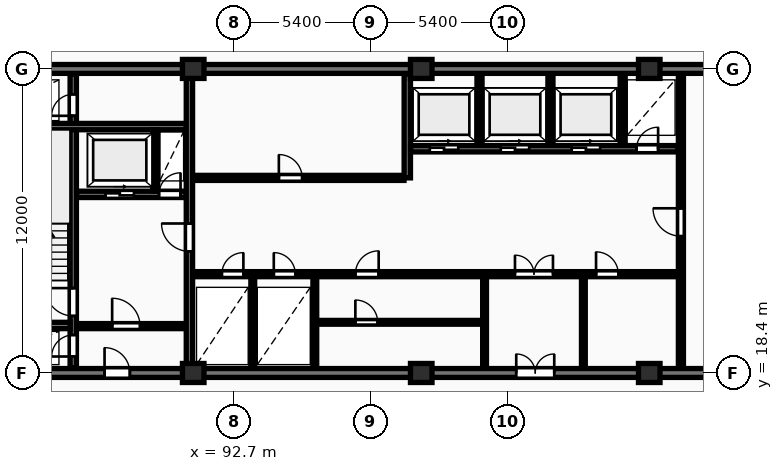
"""IFC4 building model, lengths in metres.
Left out: names, types, materials, properties, quantities, classifications, styles, units other than length and angle.
Written with IfcOpenShell. Run it as: python <this file> out.ifc"""

import sys

from ifc_helpers import new_model, si_unit, direction, frame, frame_2d, origin, origin_2d, place, context, subcontext, project, spatial, rectangle, extrude, element, fill, save


model = new_model("IFC4")
c1 = context("Model", 3, precision=1e-05, world=origin(), true_north=direction((0.0, 1.0)))
c2 = subcontext(c1, "Body", "Model", "MODEL_VIEW")
j1 = project(units=[si_unit("LENGTHUNIT", "METRE"), si_unit("PLANEANGLEUNIT", "RADIAN")], contexts=[c1])
p1 = place(None, origin())
s1 = spatial("IfcSite", under=j1, at=p1, CompositionType="ELEMENT")
p2 = place(p1, origin())
s2 = spatial("IfcBuilding", under=s1, at=p2, CompositionType="ELEMENT")
p3 = place(p2, frame((0.0, 0.0, 119.8)))
s3 = spatial("IfcBuildingStorey", under=s2, at=p3, CompositionType="ELEMENT", Elevation=119.8)
for number, where, z_axis, x_axis in (
    (1, (91.1, 18.4, 0.0), (0.0, 0.0, 1.0), (1.0, 0.0, 0.0)),
    (2, (91.1, 30.4, 0.0), (0.0, 0.0, 1.0), (1.0, 0.0, 0.0)),
    (3, (100.1, 18.4, 0.0), (0.0, 0.0, 1.0), (1.0, 0.0, 0.0)),
    (4, (100.1, 30.4, 0.0), (0.0, 0.0, 1.0), (1.0, 0.0, 0.0)),
    (5, (109.1, 18.4, 0.0), (0.0, 0.0, 1.0), (1.0, 0.0, 0.0)),
    (6, (109.1, 30.4, 0.0), (0.0, 0.0, 1.0), (1.0, 0.0, 0.0)),
):
    element("IfcColumn", number, at=place(p3, frame(where, z_axis=z_axis, x_axis=x_axis)), inside=s3, PredefinedType="COLUMN", context=c2, shape_type="SweptSolid", body=[
        extrude(rectangle(XDim=0.85, YDim=0.75, at=origin_2d()), origin(), (0.0, 0.0, 1.0), 3.25),
    ])
p4 = place(p3, frame((81.925, 30.4, 0.0), z_axis=(0.0, 0.0, 1.0), x_axis=(1.0, 0.0, 0.0)))
e7 = element("IfcWall", 7, at=p4, inside=s3, PredefinedType="SHEAR", context=c2, shape_type="SweptSolid", body=[
    extrude(rectangle(XDim=36.265, YDim=0.35, at=frame_2d((18.132, 0.0))), origin(), (0.0, 0.0, 1.0), 3.25),
])
p5 = place(p3, frame((81.925, 18.4, 0.0), z_axis=(0.0, 0.0, 1.0), x_axis=(1.0, 0.0, 0.0)))
e8 = element("IfcWall", 8, at=p5, inside=s3, PredefinedType="SHEAR", context=c2, shape_type="SweptSolid", body=[
    extrude(rectangle(XDim=36.265, YDim=0.35, at=frame_2d((18.132, 0.0))), origin(), (0.0, 0.0, 1.0), 3.25),
])
p6 = place(p5, frame((5.675, 0.0, 0.0)))
e9 = element("IfcOpeningElement", 9, at=p6, cuts=e8, PredefinedType="OPENING", context=c2, shape_type="SweptSolid", body=[
    extrude(rectangle(XDim=1.0, YDim=2.15, at=frame_2d((0.5, 1.075))), frame((0.0, 0.185, 0.0), z_axis=(0.0, -1.0, 0.0), x_axis=(1.0, 0.0, 0.0)), (0.0, 0.0, 1.0), 0.37),
])
p7 = place(p5, frame((21.925, 0.0, 0.0)))
e10 = element("IfcOpeningElement", 10, at=p7, cuts=e8, PredefinedType="OPENING", context=c2, shape_type="SweptSolid", body=[
    extrude(rectangle(XDim=1.5, YDim=2.2, at=frame_2d((0.75, 1.1))), frame((0.0, 0.185, 0.0), z_axis=(0.0, -1.0, 0.0), x_axis=(1.0, 0.0, 0.0)), (0.0, 0.0, 1.0), 0.37),
])
p8 = place(p5, frame((29.875, 0.0, 0.0)))
e11 = element("IfcOpeningElement", 11, at=p8, cuts=e8, PredefinedType="OPENING", context=c2, shape_type="SweptSolid", body=[
    extrude(rectangle(XDim=1.0, YDim=2.15, at=frame_2d((0.5, 1.075))), frame((0.0, 0.185, 0.0), z_axis=(0.0, -1.0, 0.0), x_axis=(1.0, 0.0, 0.0)), (0.0, 0.0, 1.0), 0.37),
])
p9 = place(p3, frame((86.365, 18.6, 0.0), z_axis=(0.0, 0.0, 1.0), x_axis=(0.0, 1.0, 0.0)))
e12 = element("IfcWall", 12, at=p9, inside=s3, PredefinedType="SHEAR", context=c2, shape_type="SweptSolid", body=[
    extrude(rectangle(XDim=11.6, YDim=0.25, at=frame_2d((5.8, 0.0))), origin(), (0.0, 0.0, 1.0), 3.25),
])
p10 = place(p9, frame((0.45, 0.0, 0.0)))
e13 = element("IfcOpeningElement", 13, at=p10, cuts=e12, PredefinedType="OPENING", context=c2, shape_type="SweptSolid", body=[
    extrude(rectangle(XDim=0.85, YDim=2.05, at=frame_2d((0.425, 1.025))), frame((0.0, 0.135, 0.0), z_axis=(0.0, -1.0, 0.0), x_axis=(1.0, 0.0, 0.0)), (0.0, 0.0, 1.0), 0.27),
])
p11 = place(p9, frame((2.05, 0.0, 0.0)))
e14 = element("IfcOpeningElement", 14, at=p11, cuts=e12, PredefinedType="OPENING", context=c2, shape_type="SweptSolid", body=[
    extrude(rectangle(XDim=1.1, YDim=2.1, at=frame_2d((0.55, 1.05))), frame((0.0, 0.135, 0.0), z_axis=(0.0, -1.0, 0.0), x_axis=(1.0, 0.0, 0.0)), (0.0, 0.0, 1.0), 0.27),
])
p12 = place(p9, frame((9.95, 0.0, 0.0)))
e15 = element("IfcOpeningElement", 15, at=p12, cuts=e12, PredefinedType="OPENING", context=c2, shape_type="SweptSolid", body=[
    extrude(rectangle(XDim=0.85, YDim=2.05, at=frame_2d((0.425, 1.025))), frame((0.0, 0.135, 0.0), z_axis=(0.0, -1.0, 0.0), x_axis=(1.0, 0.0, 0.0)), (0.0, 0.0, 1.0), 0.27),
])
p13 = place(p3, frame((83.0, 20.275, 0.0), z_axis=(0.0, 0.0, 1.0), x_axis=(1.0, 0.0, 0.0)))
e16 = element("IfcWall", 16, at=p13, inside=s3, PredefinedType="SHEAR", context=c2, shape_type="SweptSolid", body=[
    extrude(rectangle(XDim=3.24, YDim=0.25, at=frame_2d((1.62, 0.0))), origin(), (0.0, 0.0, 1.0), 3.25),
])
p14 = place(p3, frame((83.0, 28.125, 0.0), z_axis=(0.0, 0.0, 1.0), x_axis=(1.0, 0.0, 0.0)))
e17 = element("IfcWall", 17, at=p14, inside=s3, PredefinedType="SHEAR", context=c2, shape_type="SweptSolid", body=[
    extrude(rectangle(XDim=7.82, YDim=0.25, at=frame_2d((3.91, 0.0))), origin(), (0.0, 0.0, 1.0), 3.25),
])
p15 = place(p3, frame((86.5, 25.45, 0.0), z_axis=(0.0, 0.0, 1.0), x_axis=(1.0, 0.0, 0.0)))
e18 = element("IfcWall", 18, at=p15, inside=s3, PredefinedType="SHEAR", context=c2, shape_type="SweptSolid", body=[
    extrude(rectangle(XDim=4.32, YDim=0.25, at=frame_2d((2.16, 0.0))), origin(), (0.0, 0.0, 1.0), 3.25),
])
p16 = place(p15, frame((1.14, 0.0, 0.0)))
e19 = element("IfcOpeningElement", 19, at=p16, cuts=e18, PredefinedType="OPENING", context=c2, shape_type="SweptSolid", body=[
    extrude(rectangle(XDim=1.12, YDim=2.12, at=frame_2d((0.56, 1.06))), frame((0.0, 0.135, 0.0), z_axis=(0.0, -1.0, 0.0), x_axis=(1.0, 0.0, 0.0)), (0.0, 0.0, 1.0), 0.27),
])
p17 = place(p15, frame((3.25, 0.0, 0.0)))
e20 = element("IfcOpeningElement", 20, at=p17, cuts=e18, PredefinedType="OPENING", context=c2, shape_type="SweptSolid", body=[
    extrude(rectangle(XDim=0.85, YDim=2.05, at=frame_2d((0.425, 1.025))), frame((0.0, 0.135, 0.0), z_axis=(0.0, -1.0, 0.0), x_axis=(1.0, 0.0, 0.0)), (0.0, 0.0, 1.0), 0.27),
])
p18 = place(p3, frame((89.6, 25.58, 0.0), z_axis=(0.0, 0.0, 1.0), x_axis=(0.0, 1.0, 0.0)))
e21 = element("IfcWall", 21, at=p18, inside=s3, PredefinedType="PARTITIONING", context=c2, shape_type="SweptSolid", body=[
    extrude(rectangle(XDim=2.42, YDim=0.2, at=frame_2d((1.21, 0.0))), origin(), (0.0, 0.0, 1.0), 2.97),
])
p19 = place(p3, frame((86.5, 20.25, 0.0), z_axis=(0.0, 0.0, 1.0), x_axis=(1.0, 0.0, 0.0)))
e22 = element("IfcWall", 22, at=p19, inside=s3, PredefinedType="PARTITIONING", context=c2, shape_type="SweptSolid", body=[
    extrude(rectangle(XDim=4.32, YDim=0.2, at=frame_2d((2.16, 0.0))), origin(), (0.0, 0.0, 1.0), 2.97),
])
p20 = place(p19, frame((1.4, 0.0, 0.0)))
e23 = element("IfcOpeningElement", 23, at=p20, cuts=e22, PredefinedType="OPENING", context=c2, shape_type="SweptSolid", body=[
    extrude(rectangle(XDim=1.1, YDim=2.1, at=frame_2d((0.55, 1.05))), frame((0.0, 0.11, 0.0), z_axis=(0.0, -1.0, 0.0), x_axis=(1.0, 0.0, 0.0)), (0.0, 0.0, 1.0), 0.22),
])
p21 = place(p3, frame((90.95, 18.6, 0.0), z_axis=(0.0, 0.0, 1.0), x_axis=(0.0, 1.0, 0.0)))
e24 = element("IfcWall", 24, at=p21, inside=s3, PredefinedType="SHEAR", context=c2, shape_type="SweptSolid", body=[
    extrude(rectangle(XDim=11.6, YDim=0.25, at=frame_2d((5.8, 0.0))), origin(), (0.0, 0.0, 1.0), 3.25),
])
p22 = place(p21, frame((4.6, 0.0, 0.0)))
e25 = element("IfcOpeningElement", 25, at=p22, cuts=e24, PredefinedType="OPENING", context=c2, shape_type="SweptSolid", body=[
    extrude(rectangle(XDim=1.1, YDim=2.1, at=frame_2d((0.55, 1.05))), frame((0.0, 0.135, 0.0), z_axis=(0.0, -1.0, 0.0), x_axis=(1.0, 0.0, 0.0)), (0.0, 0.0, 1.0), 0.27),
])
p23 = place(p3, frame((91.08, 26.1, 0.0), z_axis=(0.0, 0.0, 1.0), x_axis=(1.0, 0.0, 0.0)))
e26 = element("IfcWall", 26, at=p23, inside=s3, PredefinedType="PARTITIONING", context=c2, shape_type="SweptSolid", body=[
    extrude(rectangle(XDim=8.34, YDim=0.2, at=frame_2d((4.17, 0.0))), origin(), (0.0, 0.0, 1.0), 2.97),
])
p24 = place(p23, frame((3.4, 0.0, 0.0)))
e27 = element("IfcOpeningElement", 27, at=p24, cuts=e26, PredefinedType="OPENING", context=c2, shape_type="SweptSolid", body=[
    extrude(rectangle(XDim=0.92, YDim=2.08, at=frame_2d((0.46, 1.04))), frame((0.0, 0.11, 0.0), z_axis=(0.0, -1.0, 0.0), x_axis=(1.0, 0.0, 0.0)), (0.0, 0.0, 1.0), 0.22),
])
p25 = place(p3, frame((99.55, 26.1, 0.0), z_axis=(0.0, 0.0, 1.0), x_axis=(0.0, 1.0, 0.0)))
e28 = element("IfcWall", 28, at=p25, inside=s3, PredefinedType="SHEAR", context=c2, shape_type="SweptSolid", body=[
    extrude(rectangle(XDim=4.1, YDim=0.25, at=frame_2d((2.05, 0.0))), origin(), (0.0, 0.0, 1.0), 3.25),
])
for number, where, z_axis, x_axis in (
    (29, (102.4, 27.38, 0.0), (0.0, 0.0, 1.0), (0.0, 1.0, 0.0)),
    (30, (105.2, 27.38, 0.0), (0.0, 0.0, 1.0), (0.0, 1.0, 0.0)),
    (31, (108.05, 27.38, 0.0), (0.0, 0.0, 1.0), (0.0, 1.0, 0.0)),
):
    element("IfcWall", number, at=place(p3, frame(where, z_axis=z_axis, x_axis=x_axis)), inside=s3, PredefinedType="PARTITIONING", context=c2, shape_type="SweptSolid", body=[
        extrude(rectangle(XDim=2.82, YDim=0.2, at=frame_2d((1.41, 0.0))), origin(), (0.0, 0.0, 1.0), 2.97),
    ])
p26 = place(p3, frame((99.68, 27.25, 0.0), z_axis=(0.0, 0.0, 1.0), x_axis=(1.0, 0.0, 0.0)))
e32 = element("IfcWall", 32, at=p26, inside=s3, PredefinedType="SHEAR", context=c2, shape_type="SweptSolid", body=[
    extrude(rectangle(XDim=10.54, YDim=0.25, at=frame_2d((5.27, 0.0))), origin(), (0.0, 0.0, 1.0), 3.25),
])
p27 = place(p26, frame((0.76, 0.0, 0.0)))
e33 = element("IfcOpeningElement", 33, at=p27, cuts=e32, PredefinedType="OPENING", context=c2, shape_type="SweptSolid", body=[
    extrude(rectangle(XDim=1.12, YDim=2.12, at=frame_2d((0.56, 1.06))), frame((0.0, 0.135, 0.0), z_axis=(0.0, -1.0, 0.0), x_axis=(1.0, 0.0, 0.0)), (0.0, 0.0, 1.0), 0.27),
])
p28 = place(p26, frame((3.56, 0.0, 0.0)))
e34 = element("IfcOpeningElement", 34, at=p28, cuts=e32, PredefinedType="OPENING", context=c2, shape_type="SweptSolid", body=[
    extrude(rectangle(XDim=1.12, YDim=2.12, at=frame_2d((0.56, 1.06))), frame((0.0, 0.135, 0.0), z_axis=(0.0, -1.0, 0.0), x_axis=(1.0, 0.0, 0.0)), (0.0, 0.0, 1.0), 0.27),
])
p29 = place(p26, frame((6.36, 0.0, 0.0)))
e35 = element("IfcOpeningElement", 35, at=p29, cuts=e32, PredefinedType="OPENING", context=c2, shape_type="SweptSolid", body=[
    extrude(rectangle(XDim=1.12, YDim=2.12, at=frame_2d((0.56, 1.06))), frame((0.0, 0.135, 0.0), z_axis=(0.0, -1.0, 0.0), x_axis=(1.0, 0.0, 0.0)), (0.0, 0.0, 1.0), 0.27),
])
p30 = place(p26, frame((8.92, 0.0, 0.0)))
e36 = element("IfcOpeningElement", 36, at=p30, cuts=e32, PredefinedType="OPENING", context=c2, shape_type="SweptSolid", body=[
    extrude(rectangle(XDim=0.85, YDim=2.05, at=frame_2d((0.425, 1.025))), frame((0.0, 0.135, 0.0), z_axis=(0.0, -1.0, 0.0), x_axis=(1.0, 0.0, 0.0)), (0.0, 0.0, 1.0), 0.27),
])
for number, where, z_axis, x_axis in (
    (37, (93.45, 18.6, 0.0), (0.0, 0.0, 1.0), (0.0, 1.0, 0.0)),
    (38, (95.9, 18.6, 0.0), (0.0, 0.0, 1.0), (0.0, 1.0, 0.0)),
):
    element("IfcWall", number, at=place(p3, frame(where, z_axis=z_axis, x_axis=x_axis)), inside=s3, PredefinedType="PARTITIONING", context=c2, shape_type="SweptSolid", body=[
        extrude(rectangle(XDim=3.6, YDim=0.15, at=frame_2d((1.8, 0.0))), origin(), (0.0, 0.0, 1.0), 2.97),
    ])
p31 = place(p3, frame((95.9, 20.4, 0.0), z_axis=(0.0, 0.0, 1.0), x_axis=(1.0, 0.0, 0.0)))
e39 = element("IfcWall", 39, at=p31, inside=s3, PredefinedType="PARTITIONING", context=c2, shape_type="SweptSolid", body=[
    extrude(rectangle(XDim=6.7, YDim=0.15, at=frame_2d((3.35, 0.0))), origin(), (0.0, 0.0, 1.0), 2.97),
])
p32 = place(p31, frame((1.6, 0.0, 0.0)))
e40 = element("IfcOpeningElement", 40, at=p32, cuts=e39, PredefinedType="OPENING", context=c2, shape_type="SweptSolid", body=[
    extrude(rectangle(XDim=0.88, YDim=2.06, at=frame_2d((0.44, 1.03))), frame((0.0, 0.085, 0.0), z_axis=(0.0, -1.0, 0.0), x_axis=(1.0, 0.0, 0.0)), (0.0, 0.0, 1.0), 0.17),
])
for number, where, z_axis, x_axis in (
    (41, (102.6, 18.6, 0.0), (0.0, 0.0, 1.0), (0.0, 1.0, 0.0)),
    (42, (106.5, 18.6, 0.0), (0.0, 0.0, 1.0), (0.0, 1.0, 0.0)),
):
    element("IfcWall", number, at=place(p3, frame(where, z_axis=z_axis, x_axis=x_axis)), inside=s3, PredefinedType="PARTITIONING", context=c2, shape_type="SweptSolid", body=[
        extrude(rectangle(XDim=3.6, YDim=0.15, at=frame_2d((1.8, 0.0))), origin(), (0.0, 0.0, 1.0), 2.97),
    ])
p33 = place(p3, frame((91.08, 22.3, 0.0), z_axis=(0.0, 0.0, 1.0), x_axis=(1.0, 0.0, 0.0)))
e43 = element("IfcWall", 43, at=p33, inside=s3, PredefinedType="PARTITIONING", context=c2, shape_type="SweptSolid", body=[
    extrude(rectangle(XDim=19.14, YDim=0.2, at=frame_2d((9.57, 0.0))), origin(), (0.0, 0.0, 1.0), 2.97),
])
p34 = place(p33, frame((1.15, 0.0, 0.0)))
e44 = element("IfcOpeningElement", 44, at=p34, cuts=e43, PredefinedType="OPENING", context=c2, shape_type="SweptSolid", body=[
    extrude(rectangle(XDim=0.85, YDim=2.05, at=frame_2d((0.425, 1.025))), frame((0.0, 0.11, 0.0), z_axis=(0.0, -1.0, 0.0), x_axis=(1.0, 0.0, 0.0)), (0.0, 0.0, 1.0), 0.22),
])
p35 = place(p33, frame((3.2, 0.0, 0.0)))
e45 = element("IfcOpeningElement", 45, at=p35, cuts=e43, PredefinedType="OPENING", context=c2, shape_type="SweptSolid", body=[
    extrude(rectangle(XDim=0.85, YDim=2.05, at=frame_2d((0.425, 1.025))), frame((0.0, 0.11, 0.0), z_axis=(0.0, -1.0, 0.0), x_axis=(1.0, 0.0, 0.0)), (0.0, 0.0, 1.0), 0.22),
])
p36 = place(p33, frame((12.72, 0.0, 0.0)))
e46 = element("IfcOpeningElement", 46, at=p36, cuts=e43, PredefinedType="OPENING", context=c2, shape_type="SweptSolid", body=[
    extrude(rectangle(XDim=1.5, YDim=2.2, at=frame_2d((0.75, 1.1))), frame((0.0, 0.11, 0.0), z_axis=(0.0, -1.0, 0.0), x_axis=(1.0, 0.0, 0.0)), (0.0, 0.0, 1.0), 0.22),
])
p37 = place(p33, frame((6.42, 0.0, 0.0)))
e47 = element("IfcOpeningElement", 47, at=p37, cuts=e43, PredefinedType="OPENING", context=c2, shape_type="SweptSolid", body=[
    extrude(rectangle(XDim=0.92, YDim=2.08, at=frame_2d((0.46, 1.04))), frame((0.0, 0.11, 0.0), z_axis=(0.0, -1.0, 0.0), x_axis=(1.0, 0.0, 0.0)), (0.0, 0.0, 1.0), 0.22),
])
p38 = place(p33, frame((15.92, 0.0, 0.0)))
e48 = element("IfcOpeningElement", 48, at=p38, cuts=e43, PredefinedType="OPENING", context=c2, shape_type="SweptSolid", body=[
    extrude(rectangle(XDim=0.88, YDim=2.06, at=frame_2d((0.44, 1.03))), frame((0.0, 0.11, 0.0), z_axis=(0.0, -1.0, 0.0), x_axis=(1.0, 0.0, 0.0)), (0.0, 0.0, 1.0), 0.22),
])
p39 = place(p3, frame((110.35, 18.6, 0.0), z_axis=(0.0, 0.0, 1.0), x_axis=(0.0, 1.0, 0.0)))
e49 = element("IfcWall", 49, at=p39, inside=s3, PredefinedType="PARTITIONING", context=c2, shape_type="SweptSolid", body=[
    extrude(rectangle(XDim=11.6, YDim=0.2, at=frame_2d((5.8, 0.0))), origin(), (0.0, 0.0, 1.0), 2.97),
])
p40 = place(p39, frame((5.2, 0.0, 0.0)))
e50 = element("IfcOpeningElement", 50, at=p40, cuts=e49, PredefinedType="OPENING", context=c2, shape_type="SweptSolid", body=[
    extrude(rectangle(XDim=1.1, YDim=2.15, at=frame_2d((0.55, 1.075))), frame((0.0, 0.11, 0.0), z_axis=(0.0, -1.0, 0.0), x_axis=(1.0, 0.0, 0.0)), (0.0, 0.0, 1.0), 0.22),
])
p41 = place(p6, origin())
e51 = element("IfcDoor", 51, at=p41, inside=s3, OperationType="SINGLE_SWING_LEFT", PredefinedType="DOOR", context=c2, shape_type="SweptSolid", body=[
    extrude(rectangle(XDim=1.0, YDim=2.15, at=frame_2d((0.5, 1.075))), frame((0.0, 0.025, 0.0), z_axis=(0.0, -1.0, 0.0), x_axis=(1.0, 0.0, 0.0)), (0.0, 0.0, 1.0), 0.05),
])
fill(e9, e51)
p42 = place(p7, origin())
e52 = element("IfcDoor", 52, at=p42, inside=s3, OperationType="DOUBLE_DOOR_SINGLE_SWING", PredefinedType="DOOR", context=c2, shape_type="SweptSolid", body=[
    extrude(rectangle(XDim=1.5, YDim=2.2, at=frame_2d((0.75, 1.1))), frame((0.0, 0.025, 0.0), z_axis=(0.0, -1.0, 0.0), x_axis=(1.0, 0.0, 0.0)), (0.0, 0.0, 1.0), 0.05),
])
fill(e10, e52)
p43 = place(p10, origin())
e53 = element("IfcDoor", 53, at=p43, inside=s3, OperationType="SINGLE_SWING_LEFT", PredefinedType="DOOR", context=c2, shape_type="SweptSolid", body=[
    extrude(rectangle(XDim=0.85, YDim=2.05, at=frame_2d((0.425, 1.025))), frame((0.0, 0.025, 0.0), z_axis=(0.0, -1.0, 0.0), x_axis=(1.0, 0.0, 0.0)), (0.0, 0.0, 1.0), 0.05),
])
fill(e13, e53)
p44 = place(p11, origin())
e54 = element("IfcDoor", 54, at=p44, inside=s3, OperationType="SINGLE_SWING_RIGHT", PredefinedType="DOOR", context=c2, shape_type="SweptSolid", body=[
    extrude(rectangle(XDim=1.1, YDim=2.1, at=frame_2d((0.55, 1.05))), frame((0.0, 0.025, 0.0), z_axis=(0.0, -1.0, 0.0), x_axis=(1.0, 0.0, 0.0)), (0.0, 0.0, 1.0), 0.05),
])
fill(e14, e54)
p45 = place(p12, origin())
e55 = element("IfcDoor", 55, at=p45, inside=s3, OperationType="SINGLE_SWING_LEFT", PredefinedType="DOOR", context=c2, shape_type="SweptSolid", body=[
    extrude(rectangle(XDim=0.85, YDim=2.05, at=frame_2d((0.425, 1.025))), frame((0.0, 0.025, 0.0), z_axis=(0.0, -1.0, 0.0), x_axis=(1.0, 0.0, 0.0)), (0.0, 0.0, 1.0), 0.05),
])
fill(e15, e55)
p46 = place(p16, origin())
e56 = element("IfcDoor", 56, at=p46, inside=s3, OperationType="SLIDING_TO_RIGHT", PredefinedType="DOOR", context=c2, shape_type="SweptSolid", body=[
    extrude(rectangle(XDim=1.12, YDim=2.12, at=frame_2d((0.56, 1.06))), frame((0.0, 0.025, 0.0), z_axis=(0.0, -1.0, 0.0), x_axis=(1.0, 0.0, 0.0)), (0.0, 0.0, 1.0), 0.05),
])
fill(e19, e56)
p47 = place(p17, origin())
e57 = element("IfcDoor", 57, at=p47, inside=s3, OperationType="SINGLE_SWING_RIGHT", PredefinedType="DOOR", context=c2, shape_type="SweptSolid", body=[
    extrude(rectangle(XDim=0.85, YDim=2.05, at=frame_2d((0.425, 1.025))), frame((0.0, 0.025, 0.0), z_axis=(0.0, -1.0, 0.0), x_axis=(1.0, 0.0, 0.0)), (0.0, 0.0, 1.0), 0.05),
])
fill(e20, e57)
p48 = place(p20, origin())
e58 = element("IfcDoor", 58, at=p48, inside=s3, OperationType="SINGLE_SWING_LEFT", PredefinedType="DOOR", context=c2, shape_type="SweptSolid", body=[
    extrude(rectangle(XDim=1.1, YDim=2.1, at=frame_2d((0.55, 1.05))), frame((0.0, 0.025, 0.0), z_axis=(0.0, -1.0, 0.0), x_axis=(1.0, 0.0, 0.0)), (0.0, 0.0, 1.0), 0.05),
])
fill(e23, e58)
p49 = place(p22, origin())
e59 = element("IfcDoor", 59, at=p49, inside=s3, OperationType="SINGLE_SWING_RIGHT", PredefinedType="DOOR", context=c2, shape_type="SweptSolid", body=[
    extrude(rectangle(XDim=1.1, YDim=2.1, at=frame_2d((0.55, 1.05))), frame((0.0, 0.025, 0.0), z_axis=(0.0, -1.0, 0.0), x_axis=(1.0, 0.0, 0.0)), (0.0, 0.0, 1.0), 0.05),
])
fill(e25, e59)
p50 = place(p24, origin())
e60 = element("IfcDoor", 60, at=p50, inside=s3, OperationType="SINGLE_SWING_LEFT", PredefinedType="DOOR", context=c2, shape_type="SweptSolid", body=[
    extrude(rectangle(XDim=0.92, YDim=2.08, at=frame_2d((0.46, 1.04))), frame((0.0, 0.025, 0.0), z_axis=(0.0, -1.0, 0.0), x_axis=(1.0, 0.0, 0.0)), (0.0, 0.0, 1.0), 0.05),
])
fill(e27, e60)
p51 = place(p27, origin())
e61 = element("IfcDoor", 61, at=p51, inside=s3, OperationType="SLIDING_TO_RIGHT", PredefinedType="DOOR", context=c2, shape_type="SweptSolid", body=[
    extrude(rectangle(XDim=1.12, YDim=2.12, at=frame_2d((0.56, 1.06))), frame((0.0, 0.025, 0.0), z_axis=(0.0, -1.0, 0.0), x_axis=(1.0, 0.0, 0.0)), (0.0, 0.0, 1.0), 0.05),
])
fill(e33, e61)
p52 = place(p28, origin())
e62 = element("IfcDoor", 62, at=p52, inside=s3, OperationType="SLIDING_TO_RIGHT", PredefinedType="DOOR", context=c2, shape_type="SweptSolid", body=[
    extrude(rectangle(XDim=1.12, YDim=2.12, at=frame_2d((0.56, 1.06))), frame((0.0, 0.025, 0.0), z_axis=(0.0, -1.0, 0.0), x_axis=(1.0, 0.0, 0.0)), (0.0, 0.0, 1.0), 0.05),
])
fill(e34, e62)
p53 = place(p29, origin())
e63 = element("IfcDoor", 63, at=p53, inside=s3, OperationType="SLIDING_TO_RIGHT", PredefinedType="DOOR", context=c2, shape_type="SweptSolid", body=[
    extrude(rectangle(XDim=1.12, YDim=2.12, at=frame_2d((0.56, 1.06))), frame((0.0, 0.025, 0.0), z_axis=(0.0, -1.0, 0.0), x_axis=(1.0, 0.0, 0.0)), (0.0, 0.0, 1.0), 0.05),
])
fill(e35, e63)
p54 = place(p30, origin())
e64 = element("IfcDoor", 64, at=p54, inside=s3, OperationType="SINGLE_SWING_RIGHT", PredefinedType="DOOR", context=c2, shape_type="SweptSolid", body=[
    extrude(rectangle(XDim=0.85, YDim=2.05, at=frame_2d((0.425, 1.025))), frame((0.0, 0.025, 0.0), z_axis=(0.0, -1.0, 0.0), x_axis=(1.0, 0.0, 0.0)), (0.0, 0.0, 1.0), 0.05),
])
fill(e36, e64)
p55 = place(p32, origin())
e65 = element("IfcDoor", 65, at=p55, inside=s3, OperationType="SINGLE_SWING_LEFT", PredefinedType="DOOR", context=c2, shape_type="SweptSolid", body=[
    extrude(rectangle(XDim=0.88, YDim=2.06, at=frame_2d((0.44, 1.03))), frame((0.0, 0.025, 0.0), z_axis=(0.0, -1.0, 0.0), x_axis=(1.0, 0.0, 0.0)), (0.0, 0.0, 1.0), 0.05),
])
fill(e40, e65)
p56 = place(p34, origin())
e66 = element("IfcDoor", 66, at=p56, inside=s3, OperationType="SINGLE_SWING_RIGHT", PredefinedType="DOOR", context=c2, shape_type="SweptSolid", body=[
    extrude(rectangle(XDim=0.85, YDim=2.05, at=frame_2d((0.425, 1.025))), frame((0.0, 0.025, 0.0), z_axis=(0.0, -1.0, 0.0), x_axis=(1.0, 0.0, 0.0)), (0.0, 0.0, 1.0), 0.05),
])
fill(e44, e66)
p57 = place(p35, origin())
e67 = element("IfcDoor", 67, at=p57, inside=s3, OperationType="SINGLE_SWING_LEFT", PredefinedType="DOOR", context=c2, shape_type="SweptSolid", body=[
    extrude(rectangle(XDim=0.85, YDim=2.05, at=frame_2d((0.425, 1.025))), frame((0.0, 0.025, 0.0), z_axis=(0.0, -1.0, 0.0), x_axis=(1.0, 0.0, 0.0)), (0.0, 0.0, 1.0), 0.05),
])
fill(e45, e67)
p58 = place(p36, origin())
e68 = element("IfcDoor", 68, at=p58, inside=s3, OperationType="DOUBLE_DOOR_SINGLE_SWING", PredefinedType="DOOR", context=c2, shape_type="SweptSolid", body=[
    extrude(rectangle(XDim=1.5, YDim=2.2, at=frame_2d((0.75, 1.1))), frame((0.0, 0.025, 0.0), z_axis=(0.0, -1.0, 0.0), x_axis=(1.0, 0.0, 0.0)), (0.0, 0.0, 1.0), 0.05),
])
fill(e46, e68)
p59 = place(p37, origin())
e69 = element("IfcDoor", 69, at=p59, inside=s3, OperationType="SINGLE_SWING_RIGHT", PredefinedType="DOOR", context=c2, shape_type="SweptSolid", body=[
    extrude(rectangle(XDim=0.92, YDim=2.08, at=frame_2d((0.46, 1.04))), frame((0.0, 0.025, 0.0), z_axis=(0.0, -1.0, 0.0), x_axis=(1.0, 0.0, 0.0)), (0.0, 0.0, 1.0), 0.05),
])
fill(e47, e69)
p60 = place(p38, origin())
e70 = element("IfcDoor", 70, at=p60, inside=s3, OperationType="SINGLE_SWING_LEFT", PredefinedType="DOOR", context=c2, shape_type="SweptSolid", body=[
    extrude(rectangle(XDim=0.88, YDim=2.06, at=frame_2d((0.44, 1.03))), frame((0.0, 0.025, 0.0), z_axis=(0.0, -1.0, 0.0), x_axis=(1.0, 0.0, 0.0)), (0.0, 0.0, 1.0), 0.05),
])
fill(e48, e70)
p61 = place(p40, origin())
e71 = element("IfcDoor", 71, at=p61, inside=s3, OperationType="SINGLE_SWING_RIGHT", PredefinedType="DOOR", context=c2, shape_type="SweptSolid", body=[
    extrude(rectangle(XDim=1.1, YDim=2.15, at=frame_2d((0.55, 1.075))), frame((0.0, 0.025, 0.0), z_axis=(0.0, -1.0, 0.0), x_axis=(1.0, 0.0, 0.0)), (0.0, 0.0, 1.0), 0.05),
])
fill(e50, e71)
save(model, sys.argv[1])
